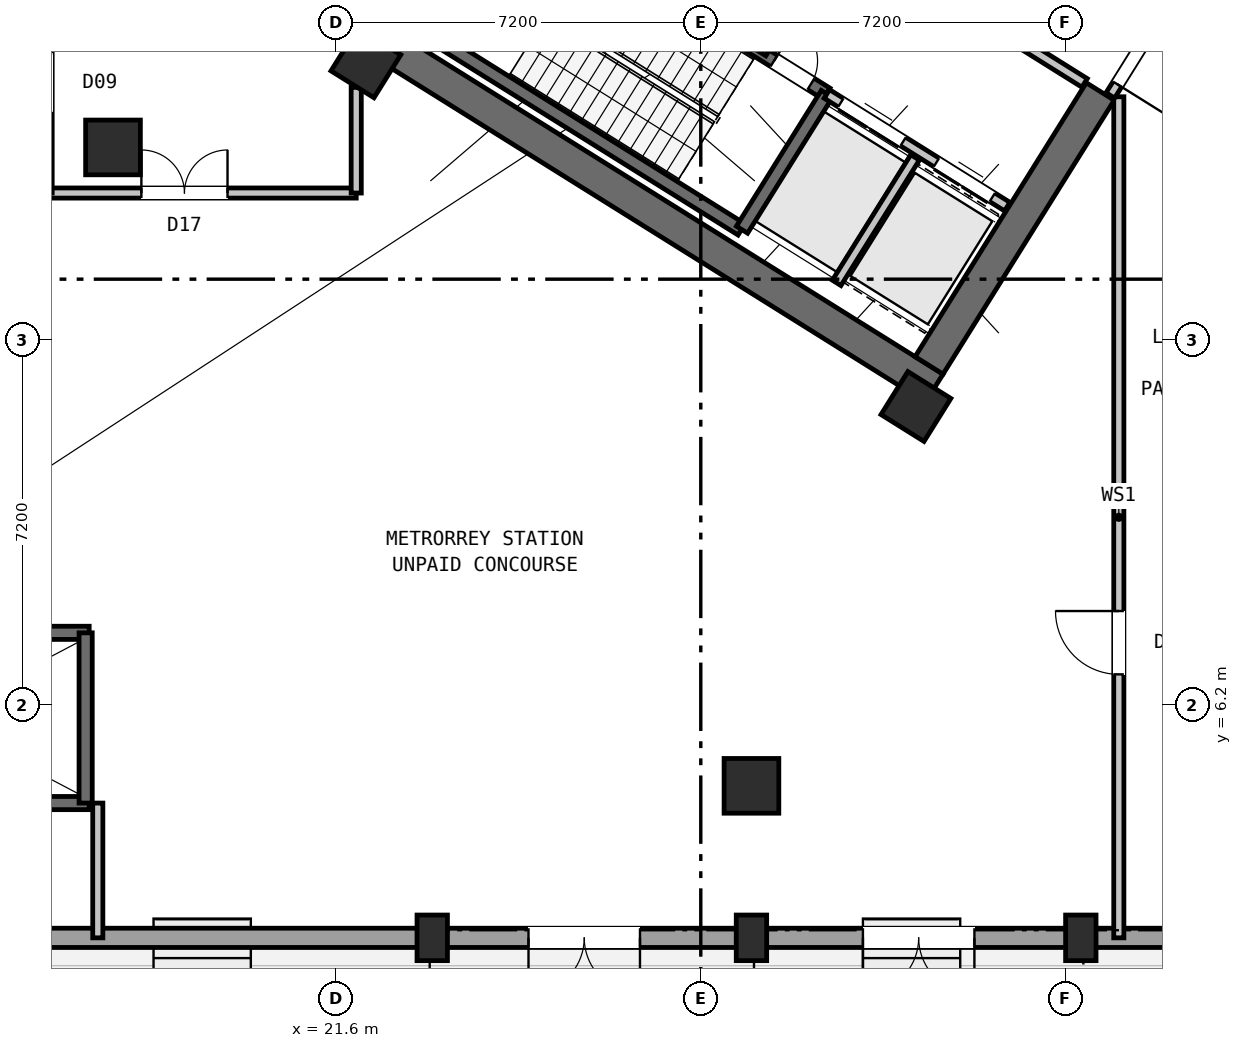
"""IFC4 building model, lengths in metres.
Left out: names, types, materials, properties, quantities, classifications, styles, units other than length and angle.
Written with IfcOpenShell. Run it as: python <this file> out.ifc"""

import sys

from ifc_helpers import new_model, si_unit, direction, frame, frame_2d, origin, origin_2d, place, context, subcontext, project, spatial, rectangle, hollow_rectangle, extrude, source, transform, mapped, element, fill, save


model = new_model("IFC4")
c1 = context("Model", 3, precision=1e-05, world=origin(), true_north=direction((0.0, 1.0)))
c2 = subcontext(c1, "Body", "Model", "MODEL_VIEW")
j1 = project(units=[si_unit("LENGTHUNIT", "METRE"), si_unit("PLANEANGLEUNIT", "RADIAN")], contexts=[c1])
p1 = place(None, origin())
s1 = spatial("IfcSite", under=j1, at=p1, CompositionType="ELEMENT")
p2 = place(p1, origin())
s2 = spatial("IfcBuilding", under=s1, at=p2, CompositionType="ELEMENT")
p3 = place(p2, origin())
s3 = spatial("IfcBuildingStorey", under=s2, at=p3, CompositionType="ELEMENT", Elevation=0.0)
p4 = place(p3, frame((33.409, 12.45, 0.0), z_axis=(0.0, 0.0, 1.0), x_axis=(-0.848051132073, 0.529914405721, 0.0)))
e1 = element("IfcWall", 1, at=p4, inside=s3, PredefinedType="SHEAR", context=c2, shape_type="SweptSolid", body=[
    extrude(rectangle(XDim=13.24, YDim=0.65, at=frame_2d((6.62, 0.0))), origin(), (0.0, 0.0, 1.0), 5.05),
])
p5 = place(p3, frame((36.683, 18.304, 0.0), z_axis=(0.0, 0.0, 1.0), x_axis=(-0.529899109053, -0.848060690178, 0.0)))
e2 = element("IfcWall", 2, at=p5, inside=s3, PredefinedType="SHEAR", context=c2, shape_type="SweptSolid", body=[
    extrude(rectangle(XDim=6.375, YDim=0.65, at=frame_2d((3.188, 0.0))), origin(), (0.0, 0.0, 1.0), 5.05),
])
m1 = source(origin(), c2, "Body", "SweptSolid", [
    extrude(hollow_rectangle(XDim=1.08, YDim=1.08, WallThickness=0.04, at=origin_2d()), origin(), (0.0, 0.0, 1.0), 5.4),
])
for number, where, z_axis, x_axis in (
    (3, (17.2, 17.2, 0.0), (0.0, 0.0, 1.0), (1.0, 0.0, 0.0)),
    (4, (29.8, 4.6, 0.0), (0.0, 0.0, 1.0), (1.0, 0.0, 0.0)),
):
    element("IfcColumn", number, at=place(p3, frame(where, z_axis=z_axis, x_axis=x_axis)), inside=s3, PredefinedType="COLUMN", context=c2, shape_type="MappedRepresentation", body=[
        mapped(m1, transform((0.0, 0.0, 0.0), scale=1.0)),
    ])
m2 = source(origin(), c2, "Body", "SweptSolid", [
    extrude(hollow_rectangle(XDim=1.0, YDim=1.0, WallThickness=0.04, at=origin_2d()), origin(), (0.0, 0.0, 1.0), 5.4),
])
for number, where, z_axis, x_axis in (
    (5, (33.046, 12.087, 0.0), (0.0, 0.0, 1.0), (-0.848, 0.53, 0.0)),
    (6, (22.191, 18.87, 0.0), (0.0, 0.0, 1.0), (-0.848, 0.53, 0.0)),
):
    element("IfcColumn", number, at=place(p3, frame(where, z_axis=z_axis, x_axis=x_axis)), inside=s3, PredefinedType="COLUMN", context=c2, shape_type="MappedRepresentation", body=[
        mapped(m2, transform((0.0, 0.0, 0.0), scale=1.0)),
    ])
m3 = source(origin(), c2, "Body", "SweptSolid", [
    extrude(rectangle(XDim=0.6, YDim=0.9, at=origin_2d()), origin(), (0.0, 0.0, 1.0), 4.53),
])
for number, where, z_axis, x_axis in (
    (7, (23.5, 1.6, -0.35), (0.0, 0.0, 1.0), (1.0, 0.0, 0.0)),
    (8, (29.8, 1.6, -0.35), (0.0, 0.0, 1.0), (1.0, 0.0, 0.0)),
    (9, (36.3, 1.6, -0.35), (0.0, 0.0, 1.0), (1.0, 0.0, 0.0)),
):
    element("IfcColumn", number, at=place(p3, frame(where, z_axis=z_axis, x_axis=x_axis)), inside=s3, PredefinedType="PILASTER", context=c2, shape_type="MappedRepresentation", body=[
        mapped(m3, transform((0.0, 0.0, 0.0), scale=1.0)),
    ])
p6 = place(p3, frame((67.117, 1.6, 0.0), z_axis=(0.0, 0.0, 1.0), x_axis=(-1.0, 0.0, 0.0)))
e10 = element("IfcWall", 10, at=p6, inside=s3, PredefinedType="STANDARD", context=c2, shape_type="SweptSolid", body=[
    extrude(rectangle(XDim=62.234, YDim=0.38, at=frame_2d((31.117, 0.0))), origin(), (0.0, 0.0, 1.0), 3.755),
])
p7 = place(p6, frame((53.077, 0.0, 0.0)))
e11 = element("IfcOpeningElement", 11, at=p7, cuts=e10, PredefinedType="OPENING", context=c2, shape_type="SweptSolid", body=[
    extrude(rectangle(XDim=1.84, YDim=2.4, at=frame_2d((0.92, 1.2))), frame((0.0, 0.2, 0.0), z_axis=(0.0, -1.0, 0.0), x_axis=(1.0, 0.0, 0.0)), (0.0, 0.0, 1.0), 0.4),
])
p8 = place(p6, frame((39.517, 0.0, 0.0)))
e12 = element("IfcOpeningElement", 12, at=p8, cuts=e10, PredefinedType="OPENING", context=c2, shape_type="SweptSolid", body=[
    extrude(rectangle(XDim=2.2, YDim=2.6, at=frame_2d((1.1, 1.3))), frame((0.0, 0.2, 0.0), z_axis=(0.0, -1.0, 0.0), x_axis=(1.0, 0.0, 0.0)), (0.0, 0.0, 1.0), 0.4),
])
p9 = place(p6, frame((32.917, 0.0, 0.0)))
e13 = element("IfcOpeningElement", 13, at=p9, cuts=e10, PredefinedType="OPENING", context=c2, shape_type="SweptSolid", body=[
    extrude(rectangle(XDim=2.2, YDim=2.6, at=frame_2d((1.1, 1.3))), frame((0.0, 0.2, 0.0), z_axis=(0.0, -1.0, 0.0), x_axis=(1.0, 0.0, 0.0)), (0.0, 0.0, 1.0), 0.4),
])
p10 = place(p6, frame((26.997, 0.0, 0.0)))
e14 = element("IfcOpeningElement", 14, at=p10, cuts=e10, PredefinedType="OPENING", context=c2, shape_type="SweptSolid", body=[
    extrude(rectangle(XDim=1.84, YDim=2.4, at=frame_2d((0.92, 1.2))), frame((0.0, 0.2, 0.0), z_axis=(0.0, -1.0, 0.0), x_axis=(1.0, 0.0, 0.0)), (0.0, 0.0, 1.0), 0.4),
])
p11 = place(p6, frame((21.017, 0.0, 0.0)))
e15 = element("IfcOpeningElement", 15, at=p11, cuts=e10, PredefinedType="OPENING", context=c2, shape_type="SweptSolid", body=[
    extrude(rectangle(XDim=2.2, YDim=2.6, at=frame_2d((1.1, 1.3))), frame((0.0, 0.2, 0.0), z_axis=(0.0, -1.0, 0.0), x_axis=(1.0, 0.0, 0.0)), (0.0, 0.0, 1.0), 0.4),
])
p12 = place(p6, frame((17.297, 0.0, 0.0)))
e16 = element("IfcOpeningElement", 16, at=p12, cuts=e10, PredefinedType="OPENING", context=c2, shape_type="SweptSolid", body=[
    extrude(rectangle(XDim=1.84, YDim=2.4, at=frame_2d((0.92, 1.2))), frame((0.0, 0.2, 0.0), z_axis=(0.0, -1.0, 0.0), x_axis=(1.0, 0.0, 0.0)), (0.0, 0.0, 1.0), 0.4),
])
p13 = place(p6, frame((12.567, 0.0, 0.0)))
e17 = element("IfcOpeningElement", 17, at=p13, cuts=e10, PredefinedType="OPENING", context=c2, shape_type="SweptSolid", body=[
    extrude(rectangle(XDim=2.2, YDim=2.6, at=frame_2d((1.1, 1.3))), frame((0.0, 0.2, 0.0), z_axis=(0.0, -1.0, 0.0), x_axis=(1.0, 0.0, 0.0)), (0.0, 0.0, 1.0), 0.4),
])
p14 = place(p6, frame((6.277, 0.0, 0.0)))
e18 = element("IfcOpeningElement", 18, at=p14, cuts=e10, PredefinedType="OPENING", context=c2, shape_type="SweptSolid", body=[
    extrude(rectangle(XDim=1.84, YDim=2.4, at=frame_2d((0.92, 1.2))), frame((0.0, 0.2, 0.0), z_axis=(0.0, -1.0, 0.0), x_axis=(1.0, 0.0, 0.0)), (0.0, 0.0, 1.0), 0.4),
])
p15 = place(p3, frame((29.605, 15.581, 0.0), z_axis=(0.0, 0.0, 1.0), x_axis=(-0.848036911448, 0.529937163087, 0.0)))
e19 = element("IfcWall", 19, at=p15, inside=s3, PredefinedType="SHEAR", context=c2, shape_type="SweptSolid", body=[
    extrude(rectangle(XDim=7.46, YDim=0.26, at=frame_2d((3.73, 0.0))), origin(), (0.0, 0.0, 1.0), 5.05),
])
p16 = place(p3, frame((31.28, 18.261, 0.0), z_axis=(0.0, 0.0, 1.0), x_axis=(-0.848051618787, 0.529913626805, 0.0)))
e20 = element("IfcWall", 20, at=p16, inside=s3, PredefinedType="SHEAR", context=c2, shape_type="SweptSolid", body=[
    extrude(rectangle(XDim=7.46, YDim=0.26, at=frame_2d((3.73, 0.0))), origin(), (0.0, 0.0, 1.0), 5.05),
])
p17 = place(p16, frame((0.36, 0.0, 0.0)))
e21 = element("IfcOpeningElement", 21, at=p17, cuts=e20, PredefinedType="OPENING", context=c2, shape_type="SweptSolid", body=[
    extrude(rectangle(XDim=0.86, YDim=2.05, at=frame_2d((0.43, 1.025))), frame((0.0, 0.14, 0.0), z_axis=(0.0, -1.0, 0.0), x_axis=(1.0, 0.0, 0.0)), (0.0, 0.0, 1.0), 0.28),
])
p18 = place(p3, frame((31.288, 18.256, 0.0), z_axis=(0.0, 0.0, 1.0), x_axis=(-0.529943379326, -0.848033026897, 0.0)))
e22 = element("IfcWall", 22, at=p18, inside=s3, PredefinedType="SHEAR", context=c2, shape_type="SweptSolid", body=[
    extrude(rectangle(XDim=3.16, YDim=0.26, at=frame_2d((1.58, 0.0))), origin(), (0.0, 0.0, 1.0), 5.05),
])
p19 = place(p3, frame((34.848, 16.031, 0.0), z_axis=(0.0, 0.0, 1.0), x_axis=(-0.848044042236, 0.529925751807, 0.0)))
e23 = element("IfcWall", 23, at=p19, inside=s3, PredefinedType="STANDARD", context=c2, shape_type="SweptSolid", body=[
    extrude(rectangle(XDim=4.198, YDim=0.2, at=frame_2d((2.099, 0.0))), origin(), (0.0, 0.0, 1.0), 5.04),
])
p20 = place(p19, frame((0.348, 0.0, 0.0)))
e24 = element("IfcOpeningElement", 24, at=p20, cuts=e23, PredefinedType="OPENING", context=c2, shape_type="SweptSolid", body=[
    extrude(rectangle(XDim=1.3, YDim=2.2, at=frame_2d((0.65, 1.1))), frame((0.0, 0.11, 0.0), z_axis=(0.0, -1.0, 0.0), x_axis=(1.0, 0.0, 0.0)), (0.0, 0.0, 1.0), 0.22),
])
p21 = place(p19, frame((2.423, 0.0, 0.0)))
e25 = element("IfcOpeningElement", 25, at=p21, cuts=e23, PredefinedType="OPENING", context=c2, shape_type="SweptSolid", body=[
    extrude(rectangle(XDim=1.45, YDim=2.25, at=frame_2d((0.725, 1.125))), frame((0.0, 0.11, 0.0), z_axis=(0.0, -1.0, 0.0), x_axis=(1.0, 0.0, 0.0)), (0.0, 0.0, 1.0), 0.22),
])
p22 = place(p3, frame((36.374, 18.474, 0.0), z_axis=(0.0, 0.0, 1.0), x_axis=(-0.848051071577, 0.529914502535, 0.0)))
e26 = element("IfcWall", 26, at=p22, inside=s3, PredefinedType="STANDARD", context=c2, shape_type="SweptSolid", body=[
    extrude(rectangle(XDim=5.718, YDim=0.2, at=frame_2d((2.859, 0.0))), origin(), (0.0, 0.0, 1.0), 5.04),
])
p23 = place(p22, frame((2.498, 0.0, 0.0)))
e27 = element("IfcOpeningElement", 27, at=p23, cuts=e26, PredefinedType="OPENING", context=c2, shape_type="SweptSolid", body=[
    extrude(rectangle(XDim=1.15, YDim=2.1, at=frame_2d((0.575, 1.05))), frame((0.0, 0.11, 0.0), z_axis=(0.0, -1.0, 0.0), x_axis=(1.0, 0.0, 0.0)), (0.0, 0.0, 1.0), 0.22),
])
p24 = place(p3, frame((33.029, 17.003, 0.0), z_axis=(0.0, 0.0, 1.0), x_axis=(-0.529916267533, -0.848049968695, 0.0)))
e28 = element("IfcWall", 28, at=p24, inside=s3, PredefinedType="STANDARD", context=c2, shape_type="SweptSolid", body=[
    extrude(rectangle(XDim=2.92, YDim=0.2, at=frame_2d((1.46, 0.0))), origin(), (0.0, 0.0, 1.0), 5.04),
])
p25 = place(p3, frame((31.525, 21.504, 0.0), z_axis=(0.0, 0.0, 1.0), x_axis=(-0.529907497854, -0.848055448493, 0.0)))
e29 = element("IfcWall", 29, at=p25, inside=s3, PredefinedType="STANDARD", context=c2, shape_type="SweptSolid", body=[
    extrude(rectangle(XDim=2.88, YDim=0.2, at=frame_2d((1.44, 0.0))), origin(), (0.0, 0.0, 1.0), 5.04),
])
p26 = place(p3, frame((9.07, 7.62, 0.0), z_axis=(0.0, 0.0, 1.0), x_axis=(1.0, 0.0, 0.0)))
e30 = element("IfcWall", 30, at=p26, inside=s3, PredefinedType="SHEAR", context=c2, shape_type="SweptSolid", body=[
    extrude(rectangle(XDim=7.66, YDim=0.26, at=frame_2d((3.83, 0.0))), origin(), (0.0, 0.0, 1.0), 5.2),
])
p27 = place(p3, frame((9.07, 4.26, 0.0), z_axis=(0.0, 0.0, 1.0), x_axis=(1.0, 0.0, 0.0)))
e31 = element("IfcWall", 31, at=p27, inside=s3, PredefinedType="SHEAR", context=c2, shape_type="SweptSolid", body=[
    extrude(rectangle(XDim=7.66, YDim=0.26, at=frame_2d((3.83, 0.0))), origin(), (0.0, 0.0, 1.0), 5.2),
])
p28 = place(p27, frame((0.36, 0.0, 0.0)))
e32 = element("IfcOpeningElement", 32, at=p28, cuts=e31, PredefinedType="OPENING", context=c2, shape_type="SweptSolid", body=[
    extrude(rectangle(XDim=0.86, YDim=2.05, at=frame_2d((0.43, 1.025))), frame((0.0, 0.14, 0.0), z_axis=(0.0, -1.0, 0.0), x_axis=(1.0, 0.0, 0.0)), (0.0, 0.0, 1.0), 0.28),
])
p29 = place(p3, frame((16.66, 4.26, 0.0), z_axis=(0.0, 0.0, 1.0), x_axis=(0.0, 1.0, 0.0)))
e33 = element("IfcWall", 33, at=p29, inside=s3, PredefinedType="SHEAR", context=c2, shape_type="SweptSolid", body=[
    extrude(rectangle(XDim=3.36, YDim=0.26, at=frame_2d((1.68, 0.0))), origin(), (0.0, 0.0, 1.0), 5.2),
])
p30 = place(p3, frame((37.05, 1.6, 0.0), z_axis=(0.0, 0.0, 1.0), x_axis=(0.0, 1.0, 0.0)))
e34 = element("IfcWall", 34, at=p30, inside=s3, PredefinedType="STANDARD", context=c2, shape_type="SweptSolid", body=[
    extrude(rectangle(XDim=16.6, YDim=0.2, at=frame_2d((8.3, 0.0))), origin(), (0.0, 0.0, 1.0), 5.04),
])
p31 = place(p30, frame((5.2, 0.0, 0.0)))
e35 = element("IfcOpeningElement", 35, at=p31, cuts=e34, PredefinedType="OPENING", context=c2, shape_type="SweptSolid", body=[
    extrude(rectangle(XDim=1.25, YDim=2.15, at=frame_2d((0.625, 1.075))), frame((0.0, 0.11, 0.0), z_axis=(0.0, -1.0, 0.0), x_axis=(1.0, 0.0, 0.0)), (0.0, 0.0, 1.0), 0.22),
])
p32 = place(p3, frame((38.451, 20.737, 0.0), z_axis=(0.0, 0.0, 1.0), x_axis=(-0.529924799939, -0.848044637038, 0.0)))
e36 = element("IfcWall", 36, at=p32, inside=s3, PredefinedType="STANDARD", context=c2, shape_type="SweptSolid", body=[
    extrude(rectangle(XDim=2.96, YDim=0.2, at=frame_2d((1.48, 0.0))), origin(), (0.0, 0.0, 1.0), 5.04),
])
p33 = place(p32, frame((1.45, 0.0, 0.0)))
e37 = element("IfcOpeningElement", 37, at=p33, cuts=e36, PredefinedType="OPENING", context=c2, shape_type="SweptSolid", body=[
    extrude(rectangle(XDim=1.25, YDim=2.15, at=frame_2d((0.625, 1.075))), frame((0.0, 0.11, 0.0), z_axis=(0.0, -1.0, 0.0), x_axis=(1.0, 0.0, 0.0)), (0.0, 0.0, 1.0), 0.22),
])
p34 = place(p3, frame((1.6, 16.3, 0.0), z_axis=(0.0, 0.0, 1.0), x_axis=(1.0, 0.0, 0.0)))
e38 = element("IfcWall", 38, at=p34, inside=s3, PredefinedType="STANDARD", context=c2, shape_type="SweptSolid", body=[
    extrude(rectangle(XDim=20.4, YDim=0.2, at=frame_2d((10.2, 0.0))), origin(), (0.0, 0.0, 1.0), 5.04),
])
p35 = place(p34, frame((16.16, 0.0, 0.0)))
e39 = element("IfcOpeningElement", 39, at=p35, cuts=e38, PredefinedType="OPENING", context=c2, shape_type="SweptSolid", body=[
    extrude(rectangle(XDim=1.7, YDim=2.2, at=frame_2d((0.85, 1.1))), frame((0.0, 0.11, 0.0), z_axis=(0.0, -1.0, 0.0), x_axis=(1.0, 0.0, 0.0)), (0.0, 0.0, 1.0), 0.22),
])
p36 = place(p3, frame((22.0, 16.3, 0.0), z_axis=(0.0, 0.0, 1.0), x_axis=(0.0, 1.0, 0.0)))
e40 = element("IfcWall", 40, at=p36, inside=s3, PredefinedType="STANDARD", context=c2, shape_type="SweptSolid", body=[
    extrude(rectangle(XDim=2.085, YDim=0.2, at=frame_2d((1.043, 0.0))), origin(), (0.0, 0.0, 1.0), 5.04),
])
p37 = place(p3, frame((16.9, 1.6, 0.0), z_axis=(0.0, 0.0, 1.0), x_axis=(0.0, 1.0, 0.0)))
e41 = element("IfcWall", 41, at=p37, inside=s3, PredefinedType="STANDARD", context=c2, shape_type="SweptSolid", body=[
    extrude(rectangle(XDim=2.66, YDim=0.2, at=frame_2d((1.33, 0.0))), origin(), (0.0, 0.0, 1.0), 5.04),
])
m4 = source(origin(), c2, "Body", "SweptSolid", [
    extrude(rectangle(XDim=2.2, YDim=2.6, at=frame_2d((1.1, 1.3))), frame((0.0, 0.025, 0.0), z_axis=(0.0, -1.0, 0.0), x_axis=(1.0, 0.0, 0.0)), (0.0, 0.0, 1.0), 0.05),
])
p38 = place(p8, origin())
e42 = element("IfcDoor", 42, at=p38, inside=s3, OperationType="DOUBLE_DOOR_SINGLE_SWING", PredefinedType="DOOR", context=c2, shape_type="MappedRepresentation", body=[
    mapped(m4, transform((0.0, 0.0, 0.0), scale=1.0)),
])
fill(e12, e42)
p39 = place(p9, origin())
e43 = element("IfcDoor", 43, at=p39, inside=s3, OperationType="DOUBLE_DOOR_SINGLE_SWING", PredefinedType="DOOR", context=c2, shape_type="MappedRepresentation", body=[
    mapped(m4, transform((0.0, 0.0, 0.0), scale=1.0)),
])
fill(e13, e43)
m5 = source(origin(), c2, "Body", "SweptSolid", [
    extrude(rectangle(XDim=0.86, YDim=2.05, at=frame_2d((0.43, 1.025))), frame((0.0, 0.025, 0.0), z_axis=(0.0, -1.0, 0.0), x_axis=(1.0, 0.0, 0.0)), (0.0, 0.0, 1.0), 0.05),
])
p40 = place(p17, frame((0.86, 0.0, 0.0), z_axis=(0.0, 0.0, 1.0), x_axis=(-1.0, 0.0, 0.0)))
e44 = element("IfcDoor", 44, at=p40, inside=s3, OperationType="SINGLE_SWING_LEFT", PredefinedType="DOOR", context=c2, shape_type="MappedRepresentation", body=[
    mapped(m5, transform((0.0, 0.0, 0.0), scale=1.0)),
])
fill(e21, e44)
m6 = source(origin(), c2, "Body", "SweptSolid", [
    extrude(rectangle(XDim=1.3, YDim=2.2, at=frame_2d((0.65, 1.1))), frame((0.0, 0.025, 0.0), z_axis=(0.0, -1.0, 0.0), x_axis=(1.0, 0.0, 0.0)), (0.0, 0.0, 1.0), 0.05),
])
p41 = place(p20, origin())
e45 = element("IfcDoor", 45, at=p41, inside=s3, OperationType="DOUBLE_DOOR_SLIDING", PredefinedType="DOOR", context=c2, shape_type="MappedRepresentation", body=[
    mapped(m6, transform((0.0, 0.0, 0.0), scale=1.0)),
])
fill(e24, e45)
m7 = source(origin(), c2, "Body", "SweptSolid", [
    extrude(rectangle(XDim=1.45, YDim=2.25, at=frame_2d((0.725, 1.125))), frame((0.0, 0.025, 0.0), z_axis=(0.0, -1.0, 0.0), x_axis=(1.0, 0.0, 0.0)), (0.0, 0.0, 1.0), 0.05),
])
p42 = place(p21, origin())
e46 = element("IfcDoor", 46, at=p42, inside=s3, OperationType="DOUBLE_DOOR_SLIDING", PredefinedType="DOOR", context=c2, shape_type="MappedRepresentation", body=[
    mapped(m7, transform((0.0, 0.0, 0.0), scale=1.0)),
])
fill(e25, e46)
m8 = source(origin(), c2, "Body", "SweptSolid", [
    extrude(rectangle(XDim=1.25, YDim=2.15, at=frame_2d((0.625, 1.075))), frame((0.0, 0.025, 0.0), z_axis=(0.0, -1.0, 0.0), x_axis=(1.0, 0.0, 0.0)), (0.0, 0.0, 1.0), 0.05),
])
p43 = place(p31, origin())
e47 = element("IfcDoor", 47, at=p43, inside=s3, OperationType="SINGLE_SWING_RIGHT", PredefinedType="DOOR", context=c2, shape_type="MappedRepresentation", body=[
    mapped(m8, transform((0.0, 0.0, 0.0), scale=1.0)),
])
fill(e35, e47)
p44 = place(p33, origin())
e48 = element("IfcDoor", 48, at=p44, inside=s3, OperationType="SINGLE_SWING_RIGHT", PredefinedType="DOOR", context=c2, shape_type="MappedRepresentation", body=[
    mapped(m8, transform((0.0, 0.0, 0.0), scale=1.0)),
])
fill(e37, e48)
m9 = source(origin(), c2, "Body", "SweptSolid", [
    extrude(rectangle(XDim=1.7, YDim=2.2, at=frame_2d((0.85, 1.1))), frame((0.0, 0.025, 0.0), z_axis=(0.0, -1.0, 0.0), x_axis=(1.0, 0.0, 0.0)), (0.0, 0.0, 1.0), 0.05),
])
p45 = place(p35, origin())
e49 = element("IfcDoor", 49, at=p45, inside=s3, OperationType="DOUBLE_DOOR_SINGLE_SWING", PredefinedType="DOOR", context=c2, shape_type="MappedRepresentation", body=[
    mapped(m9, transform((0.0, 0.0, 0.0), scale=1.0)),
])
fill(e39, e49)
save(model, sys.argv[1])
